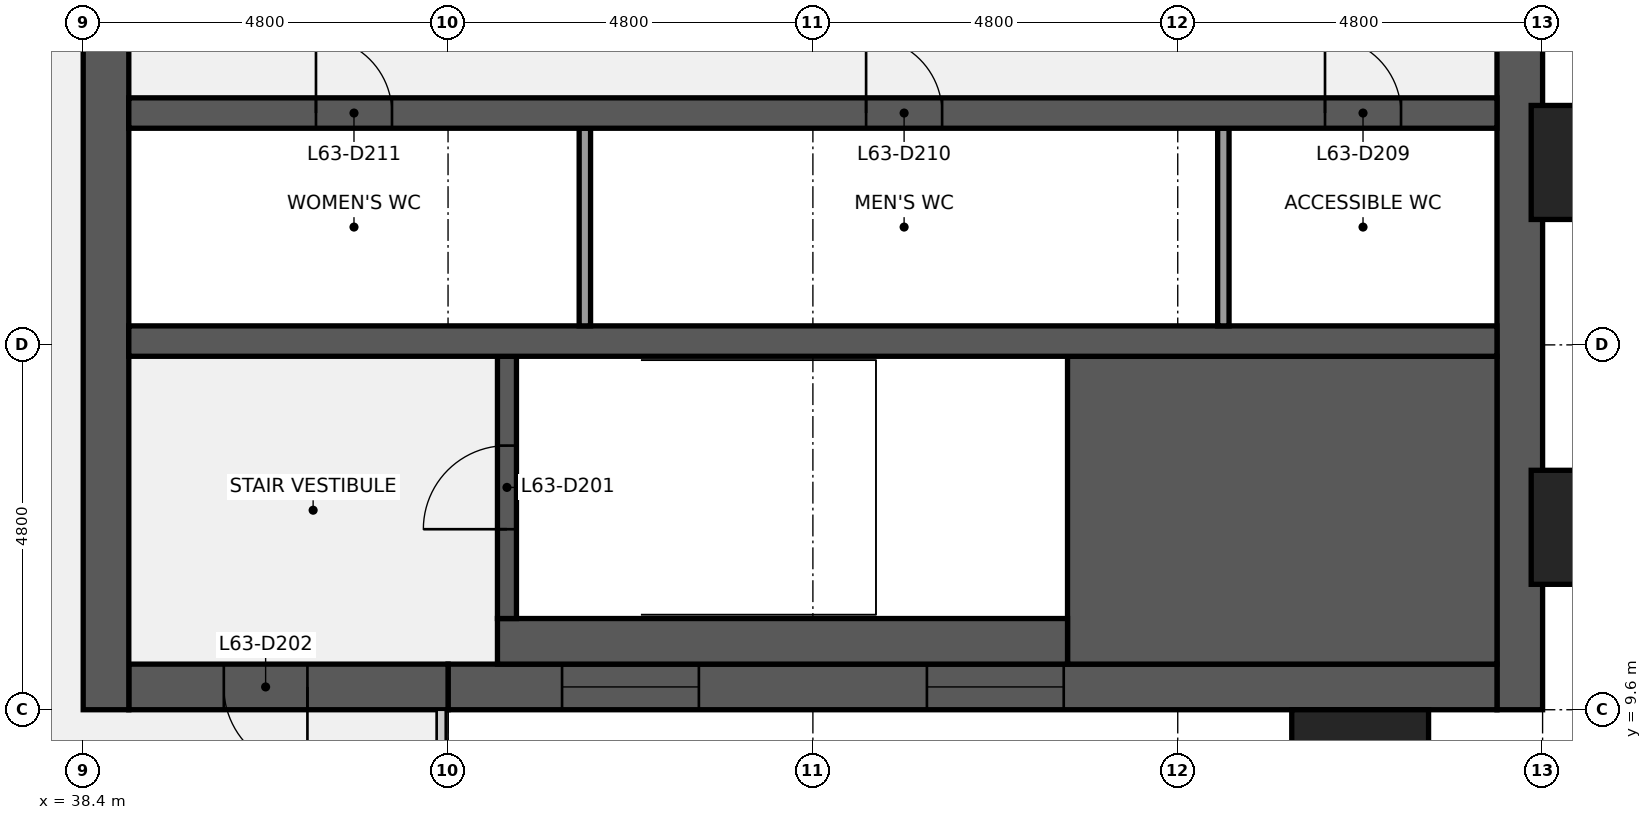
"""IFC4 building model, lengths in metres.
Left out: names, types, materials, properties, quantities, classifications, styles, units other than length and angle.
Written with IfcOpenShell. Run it as: python <this file> out.ifc"""

import sys

from ifc_helpers import new_model, si_unit, direction, frame, frame_2d, origin, origin_2d, place, context, subcontext, project, spatial, rectangle, extrude, element, fill, save


model = new_model("IFC4")
c1 = context("Model", 3, precision=1e-05, world=origin(), true_north=direction((0.0, 1.0)))
c2 = subcontext(c1, "Body", "Model", "MODEL_VIEW")
j1 = project(units=[si_unit("LENGTHUNIT", "METRE"), si_unit("PLANEANGLEUNIT", "RADIAN")], contexts=[c1])
p1 = place(None, origin())
s1 = spatial("IfcSite", under=j1, at=p1, CompositionType="ELEMENT")
p2 = place(p1, origin())
s2 = spatial("IfcBuilding", under=s1, at=p2, CompositionType="ELEMENT")
p3 = place(p2, frame((0.0, 0.0, 290.3)))
s3 = spatial("IfcBuildingStorey", under=s2, at=p3, CompositionType="ELEMENT", Elevation=290.3)
p4 = place(p3, frame((57.3, 38.4, 0.0), z_axis=(0.0, 0.0, 1.0), x_axis=(0.0, -1.0, 0.0)))
e1 = element("IfcWall", 1, at=p4, inside=s3, PredefinedType="SHEAR", context=c2, shape_type="SweptSolid", body=[
    extrude(rectangle(XDim=28.8, YDim=0.6, at=frame_2d((14.4, 0.0))), origin(), (0.0, 0.0, 1.0), 3.84),
])
p5 = place(p4, frame((18.45, 0.0, 0.9)))
e2 = element("IfcOpeningElement", 2, at=p5, cuts=e1, PredefinedType="OPENING", context=c2, shape_type="SweptSolid", body=[
    extrude(rectangle(XDim=1.5, YDim=1.5, at=frame_2d((0.75, 0.75))), frame((0.0, 0.31, 0.0), z_axis=(0.0, -1.0, 0.0), x_axis=(1.0, 0.0, 0.0)), (0.0, 0.0, 1.0), 0.62),
])
p6 = place(p4, frame((8.85, 0.0, 0.9)))
e3 = element("IfcOpeningElement", 3, at=p6, cuts=e1, PredefinedType="OPENING", context=c2, shape_type="SweptSolid", body=[
    extrude(rectangle(XDim=1.5, YDim=1.5, at=frame_2d((0.75, 0.75))), frame((0.0, 0.31, 0.0), z_axis=(0.0, -1.0, 0.0), x_axis=(1.0, 0.0, 0.0)), (0.0, 0.0, 1.0), 0.62),
])
p7 = place(p3, frame((57.0, 9.9, 0.0), z_axis=(0.0, 0.0, 1.0), x_axis=(-1.0, 0.0, 0.0)))
e4 = element("IfcWall", 4, at=p7, inside=s3, PredefinedType="SHEAR", context=c2, shape_type="SweptSolid", body=[
    extrude(rectangle(XDim=13.8, YDim=0.6, at=frame_2d((6.9, 0.0))), origin(), (0.0, 0.0, 1.0), 3.84),
])
p8 = place(p7, frame((5.7, 0.0, 0.9)))
e5 = element("IfcOpeningElement", 5, at=p8, cuts=e4, PredefinedType="OPENING", context=c2, shape_type="SweptSolid", body=[
    extrude(rectangle(XDim=1.8, YDim=1.5, at=frame_2d((0.9, 0.75))), frame((0.0, 0.31, 0.0), z_axis=(0.0, -1.0, 0.0), x_axis=(1.0, 0.0, 0.0)), (0.0, 0.0, 1.0), 0.62),
])
p9 = place(p7, frame((10.5, 0.0, 0.9)))
e6 = element("IfcOpeningElement", 6, at=p9, cuts=e4, PredefinedType="OPENING", context=c2, shape_type="SweptSolid", body=[
    extrude(rectangle(XDim=1.8, YDim=1.5, at=frame_2d((0.9, 0.75))), frame((0.0, 0.31, 0.0), z_axis=(0.0, -1.0, 0.0), x_axis=(1.0, 0.0, 0.0)), (0.0, 0.0, 1.0), 0.62),
])
p10 = place(p3, frame((43.2, 9.9, 0.0), z_axis=(0.0, 0.0, 1.0), x_axis=(-1.0, 0.0, 0.0)))
e7 = element("IfcWall", 7, at=p10, inside=s3, PredefinedType="SHEAR", context=c2, shape_type="SweptSolid", body=[
    extrude(rectangle(XDim=4.2, YDim=0.6, at=frame_2d((2.1, 0.0))), origin(), (0.0, 0.0, 1.0), 3.84),
])
p11 = place(p10, frame((1.85, 0.0, 0.0)))
e8 = element("IfcOpeningElement", 8, at=p11, cuts=e7, PredefinedType="OPENING", context=c2, shape_type="SweptSolid", body=[
    extrude(rectangle(XDim=1.1, YDim=2.1, at=frame_2d((0.55, 1.05))), frame((0.0, 0.31, 0.0), z_axis=(0.0, -1.0, 0.0), x_axis=(1.0, 0.0, 0.0)), (0.0, 0.0, 1.0), 0.62),
])
p12 = place(p3, frame((38.7, 9.6, 0.0), z_axis=(0.0, 0.0, 1.0), x_axis=(0.0, 1.0, 0.0)))
e9 = element("IfcWall", 9, at=p12, inside=s3, PredefinedType="SHEAR", context=c2, shape_type="SweptSolid", body=[
    extrude(rectangle(XDim=28.8, YDim=0.6, at=frame_2d((14.4, 0.0))), origin(), (0.0, 0.0, 1.0), 3.84),
])
p13 = place(p12, frame((8.7, 0.0, 0.0)))
e10 = element("IfcOpeningElement", 10, at=p13, cuts=e9, PredefinedType="OPENING", context=c2, shape_type="SweptSolid", body=[
    extrude(rectangle(XDim=1.8, YDim=2.1, at=frame_2d((0.9, 1.05))), frame((0.0, 0.31, 0.0), z_axis=(0.0, -1.0, 0.0), x_axis=(1.0, 0.0, 0.0)), (0.0, 0.0, 1.0), 0.62),
])
p14 = place(p12, frame((18.3, 0.0, 0.0)))
e11 = element("IfcOpeningElement", 11, at=p14, cuts=e9, PredefinedType="OPENING", context=c2, shape_type="SweptSolid", body=[
    extrude(rectangle(XDim=1.8, YDim=2.1, at=frame_2d((0.9, 1.05))), frame((0.0, 0.31, 0.0), z_axis=(0.0, -1.0, 0.0), x_axis=(1.0, 0.0, 0.0)), (0.0, 0.0, 1.0), 0.62),
])
p15 = place(p3, frame((51.35, 12.225, 0.0), z_axis=(0.0, 0.0, 1.0), x_axis=(1.0, 0.0, 0.0)))
e12 = element("IfcWall", 12, at=p15, inside=s3, PredefinedType="SHEAR", context=c2, shape_type="SweptSolid", body=[
    extrude(rectangle(XDim=5.65, YDim=4.05, at=frame_2d((2.825, 0.0))), origin(), (0.0, 0.0, 1.0), 3.84),
])
p16 = place(p3, frame((43.85, 10.5, 0.0), z_axis=(0.0, 0.0, 1.0), x_axis=(1.0, 0.0, 0.0)))
e13 = element("IfcWall", 13, at=p16, inside=s3, PredefinedType="SHEAR", context=c2, shape_type="SweptSolid", body=[
    extrude(rectangle(XDim=7.5, YDim=0.6, at=frame_2d((3.75, 0.0))), origin(), (0.0, 0.0, 1.0), 3.84),
])
p17 = place(p3, frame((43.975, 10.8, 0.0), z_axis=(0.0, 0.0, 1.0), x_axis=(0.0, 1.0, 0.0)))
e14 = element("IfcWall", 14, at=p17, inside=s3, PredefinedType="SHEAR", context=c2, shape_type="SweptSolid", body=[
    extrude(rectangle(XDim=3.45, YDim=0.25, at=frame_2d((1.725, 0.0))), origin(), (0.0, 0.0, 1.0), 3.84),
])
p18 = place(p17, frame((1.175, 0.0, 0.0)))
e15 = element("IfcOpeningElement", 15, at=p18, cuts=e14, PredefinedType="OPENING", context=c2, shape_type="SweptSolid", body=[
    extrude(rectangle(XDim=1.1, YDim=2.1, at=frame_2d((0.55, 1.05))), frame((0.0, 0.135, 0.0), z_axis=(0.0, -1.0, 0.0), x_axis=(1.0, 0.0, 0.0)), (0.0, 0.0, 1.0), 0.27),
])
p19 = place(p3, frame((39.0, 14.45, 0.0), z_axis=(0.0, 0.0, 1.0), x_axis=(1.0, 0.0, 0.0)))
e16 = element("IfcWall", 16, at=p19, inside=s3, PredefinedType="SHEAR", context=c2, shape_type="SweptSolid", body=[
    extrude(rectangle(XDim=18.0, YDim=0.4, at=frame_2d((9.0, 0.0))), origin(), (0.0, 0.0, 1.0), 3.84),
])
for number, where, z_axis, x_axis in (
    (17, (53.4, 14.65, 0.0), (0.0, 0.0, 1.0), (0.0, 1.0, 0.0)),
    (18, (45.0, 14.65, 0.0), (0.0, 0.0, 1.0), (0.0, 1.0, 0.0)),
):
    element("IfcWall", number, at=place(p3, frame(where, z_axis=z_axis, x_axis=x_axis)), inside=s3, PredefinedType="PARTITIONING", context=c2, shape_type="SweptSolid", body=[
        extrude(rectangle(XDim=2.6, YDim=0.15, at=frame_2d((1.3, 0.0))), origin(), (0.0, 0.0, 1.0), 3.84),
    ])
p20 = place(p3, frame((39.0, 17.45, 0.0), z_axis=(0.0, 0.0, 1.0), x_axis=(1.0, 0.0, 0.0)))
e19 = element("IfcWall", 19, at=p20, inside=s3, PredefinedType="SHEAR", context=c2, shape_type="SweptSolid", body=[
    extrude(rectangle(XDim=18.0, YDim=0.4, at=frame_2d((9.0, 0.0))), origin(), (0.0, 0.0, 1.0), 3.84),
])
p21 = place(p20, frame((15.738, 0.0, 0.0)))
e20 = element("IfcOpeningElement", 20, at=p21, cuts=e19, PredefinedType="OPENING", context=c2, shape_type="SweptSolid", body=[
    extrude(rectangle(XDim=1.0, YDim=2.1, at=frame_2d((0.5, 1.05))), frame((0.0, 0.21, 0.0), z_axis=(0.0, -1.0, 0.0), x_axis=(1.0, 0.0, 0.0)), (0.0, 0.0, 1.0), 0.42),
])
p22 = place(p20, frame((9.7, 0.0, 0.0)))
e21 = element("IfcOpeningElement", 21, at=p22, cuts=e19, PredefinedType="OPENING", context=c2, shape_type="SweptSolid", body=[
    extrude(rectangle(XDim=1.0, YDim=2.1, at=frame_2d((0.5, 1.05))), frame((0.0, 0.21, 0.0), z_axis=(0.0, -1.0, 0.0), x_axis=(1.0, 0.0, 0.0)), (0.0, 0.0, 1.0), 0.42),
])
p23 = place(p20, frame((2.462, 0.0, 0.0)))
e22 = element("IfcOpeningElement", 22, at=p23, cuts=e19, PredefinedType="OPENING", context=c2, shape_type="SweptSolid", body=[
    extrude(rectangle(XDim=1.0, YDim=2.1, at=frame_2d((0.5, 1.05))), frame((0.0, 0.21, 0.0), z_axis=(0.0, -1.0, 0.0), x_axis=(1.0, 0.0, 0.0)), (0.0, 0.0, 1.0), 0.42),
])
for number, where, z_axis, x_axis in (
    (23, (55.2, 8.85, 0.0), (0.0, 0.0, 1.0), (1.0, 0.0, 0.0)),
    (24, (58.35, 12.0, 0.0), (0.0, 0.0, 1.0), (0.0, 1.0, 0.0)),
    (25, (58.35, 16.8, 0.0), (0.0, 0.0, 1.0), (0.0, 1.0, 0.0)),
):
    element("IfcColumn", number, at=place(p3, frame(where, z_axis=z_axis, x_axis=x_axis)), inside=s3, PredefinedType="PILASTER", context=c2, shape_type="SweptSolid", body=[
        extrude(rectangle(XDim=1.8, YDim=1.5, at=origin_2d()), origin(), (0.0, 0.0, 1.0), 4.0),
    ])
p24 = place(p18, origin())
e26 = element("IfcDoor", 26, at=p24, inside=s3, OperationType="SINGLE_SWING_LEFT", PredefinedType="DOOR", context=c2, shape_type="SweptSolid", body=[
    extrude(rectangle(XDim=1.1, YDim=2.1, at=frame_2d((0.55, 1.05))), frame((0.0, 0.025, 0.0), z_axis=(0.0, -1.0, 0.0), x_axis=(1.0, 0.0, 0.0)), (0.0, 0.0, 1.0), 0.05),
])
fill(e15, e26)
p25 = place(p11, origin())
e27 = element("IfcDoor", 27, at=p25, inside=s3, OperationType="SINGLE_SWING_LEFT", PredefinedType="DOOR", context=c2, shape_type="SweptSolid", body=[
    extrude(rectangle(XDim=1.1, YDim=2.1, at=frame_2d((0.55, 1.05))), frame((0.0, 0.025, 0.0), z_axis=(0.0, -1.0, 0.0), x_axis=(1.0, 0.0, 0.0)), (0.0, 0.0, 1.0), 0.05),
])
fill(e8, e27)
p26 = place(p21, origin())
e28 = element("IfcDoor", 28, at=p26, inside=s3, OperationType="SINGLE_SWING_LEFT", PredefinedType="DOOR", context=c2, shape_type="SweptSolid", body=[
    extrude(rectangle(XDim=1.0, YDim=2.1, at=frame_2d((0.5, 1.05))), frame((0.0, 0.025, 0.0), z_axis=(0.0, -1.0, 0.0), x_axis=(1.0, 0.0, 0.0)), (0.0, 0.0, 1.0), 0.05),
])
fill(e20, e28)
p27 = place(p22, origin())
e29 = element("IfcDoor", 29, at=p27, inside=s3, OperationType="SINGLE_SWING_LEFT", PredefinedType="DOOR", context=c2, shape_type="SweptSolid", body=[
    extrude(rectangle(XDim=1.0, YDim=2.1, at=frame_2d((0.5, 1.05))), frame((0.0, 0.025, 0.0), z_axis=(0.0, -1.0, 0.0), x_axis=(1.0, 0.0, 0.0)), (0.0, 0.0, 1.0), 0.05),
])
fill(e21, e29)
p28 = place(p23, origin())
e30 = element("IfcDoor", 30, at=p28, inside=s3, OperationType="SINGLE_SWING_LEFT", PredefinedType="DOOR", context=c2, shape_type="SweptSolid", body=[
    extrude(rectangle(XDim=1.0, YDim=2.1, at=frame_2d((0.5, 1.05))), frame((0.0, 0.025, 0.0), z_axis=(0.0, -1.0, 0.0), x_axis=(1.0, 0.0, 0.0)), (0.0, 0.0, 1.0), 0.05),
])
fill(e22, e30)
p29 = place(p8, origin())
e31 = element("IfcWindow", 31, at=p29, inside=s3, PartitioningType="SINGLE_PANEL", PredefinedType="WINDOW", context=c2, shape_type="SweptSolid", body=[
    extrude(rectangle(XDim=1.8, YDim=1.5, at=frame_2d((0.9, 0.75))), frame((0.0, 0.03, 0.0), z_axis=(0.0, -1.0, 0.0), x_axis=(1.0, 0.0, 0.0)), (0.0, 0.0, 1.0), 0.06),
])
fill(e5, e31)
p30 = place(p9, origin())
e32 = element("IfcWindow", 32, at=p30, inside=s3, PartitioningType="SINGLE_PANEL", PredefinedType="WINDOW", context=c2, shape_type="SweptSolid", body=[
    extrude(rectangle(XDim=1.8, YDim=1.5, at=frame_2d((0.9, 0.75))), frame((0.0, 0.03, 0.0), z_axis=(0.0, -1.0, 0.0), x_axis=(1.0, 0.0, 0.0)), (0.0, 0.0, 1.0), 0.06),
])
fill(e6, e32)
save(model, sys.argv[1])
